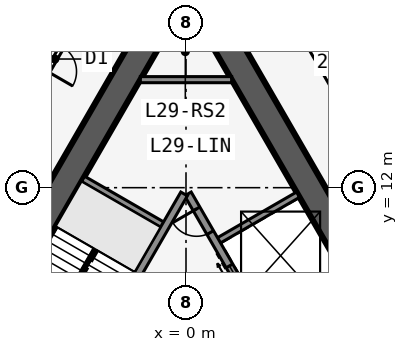
"""IFC4 building model, lengths in metres.
Left out: names, types, materials, properties, quantities, classifications, styles, units other than length and angle.
Written with IfcOpenShell. Run it as: python <this file> out.ifc"""

import sys

from ifc_helpers import new_model, si_unit, direction, frame, frame_2d, origin, place, context, subcontext, project, spatial, rectangle, extrude, element, fill, save


model = new_model("IFC4")
c1 = context("Model", 3, precision=1e-05, world=origin(), true_north=direction((0.0, 1.0)))
c2 = subcontext(c1, "Body", "Model", "MODEL_VIEW")
j1 = project(units=[si_unit("LENGTHUNIT", "METRE"), si_unit("PLANEANGLEUNIT", "RADIAN")], contexts=[c1])
p1 = place(None, origin())
s1 = spatial("IfcSite", under=j1, at=p1, CompositionType="ELEMENT")
p2 = place(p1, origin())
s2 = spatial("IfcBuilding", under=s1, at=p2, CompositionType="ELEMENT")
p3 = place(p2, frame((0.0, 0.0, 114.7)))
s3 = spatial("IfcBuildingStorey", under=s2, at=p3, CompositionType="ELEMENT", Elevation=114.7)
p4 = place(p3, frame((16.5, -9.526, 0.0), z_axis=(0.0, 0.0, 1.0), x_axis=(-0.499999749417, 0.866025548458, 0.0)))
e1 = element("IfcWall", 1, at=p4, inside=s3, PredefinedType="SHEAR", context=c2, shape_type="SweptSolid", body=[
    extrude(rectangle(XDim=33.0, YDim=0.9, at=frame_2d((16.5, 0.0))), origin(), (0.0, 0.0, 1.0), 3.4),
])
p5 = place(p4, frame((14.15, 0.0, 0.0)))
e2 = element("IfcOpeningElement", 2, at=p5, cuts=e1, PredefinedType="OPENING", context=c2, shape_type="SweptSolid", body=[
    extrude(rectangle(XDim=1.8, YDim=2.13, at=frame_2d((0.9, 1.065))), frame((0.0, 0.46, 0.0), z_axis=(0.0, -1.0, 0.0), x_axis=(1.0, 0.0, 0.0)), (0.0, 0.0, 1.0), 0.92),
])
p6 = place(p4, frame((12.6, 0.0, 0.0)))
e3 = element("IfcOpeningElement", 3, at=p6, cuts=e1, PredefinedType="OPENING", context=c2, shape_type="SweptSolid", body=[
    extrude(rectangle(XDim=1.0, YDim=2.13, at=frame_2d((0.5, 1.065))), frame((0.0, 0.46, 0.0), z_axis=(0.0, -1.0, 0.0), x_axis=(1.0, 0.0, 0.0)), (0.0, 0.0, 1.0), 0.92),
])
p7 = place(p3, frame((5.379, 2.586, 0.0), z_axis=(0.0, 0.0, 1.0), x_axis=(-0.500001375892, 0.866024609411, 0.0)))
e4 = element("IfcWall", 4, at=p7, inside=s3, PredefinedType="SOLIDWALL", context=c2, shape_type="SweptSolid", body=[
    extrude(rectangle(XDim=10.633, YDim=0.25, at=frame_2d((5.316, 0.0))), origin(), (0.0, 0.0, 1.0), 3.235),
])
p8 = place(p7, frame((9.164, 0.0, 0.0)))
e5 = element("IfcOpeningElement", 5, at=p8, cuts=e4, PredefinedType="OPENING", context=c2, shape_type="SweptSolid", body=[
    extrude(rectangle(XDim=0.9, YDim=2.13, at=frame_2d((0.45, 1.065))), frame((0.0, 0.135, 0.0), z_axis=(0.0, -1.0, 0.0), x_axis=(1.0, 0.0, 0.0)), (0.0, 0.0, 1.0), 0.27),
])
p9 = place(p7, frame((1.0, 0.0, 0.0)))
e6 = element("IfcOpeningElement", 6, at=p9, cuts=e4, PredefinedType="OPENING", context=c2, shape_type="SweptSolid", body=[
    extrude(rectangle(XDim=1.1, YDim=2.13, at=frame_2d((0.55, 1.065))), frame((0.0, 0.135, 0.0), z_axis=(0.0, -1.0, 0.0), x_axis=(1.0, 0.0, 0.0)), (0.0, 0.0, 1.0), 0.27),
])
p10 = place(p7, frame((3.9, 0.0, 0.0)))
e7 = element("IfcOpeningElement", 7, at=p10, cuts=e4, PredefinedType="OPENING", context=c2, shape_type="SweptSolid", body=[
    extrude(rectangle(XDim=1.1, YDim=2.13, at=frame_2d((0.55, 1.065))), frame((0.0, 0.135, 0.0), z_axis=(0.0, -1.0, 0.0), x_axis=(1.0, 0.0, 0.0)), (0.0, 0.0, 1.0), 0.27),
])
p11 = place(p7, frame((6.8, 0.0, 0.0)))
e8 = element("IfcOpeningElement", 8, at=p11, cuts=e4, PredefinedType="OPENING", context=c2, shape_type="SweptSolid", body=[
    extrude(rectangle(XDim=1.1, YDim=2.13, at=frame_2d((0.55, 1.065))), frame((0.0, 0.135, 0.0), z_axis=(0.0, -1.0, 0.0), x_axis=(1.0, 0.0, 0.0)), (0.0, 0.0, 1.0), 0.27),
])
for number, where, z_axis, x_axis in (
    (9, (2.429, 7.696, 0.0), (0.0, 0.0, 1.0), (0.866, 0.5, 0.0)),
    (10, (0.979, 10.207, 0.0), (0.0, 0.0, 1.0), (0.866, 0.5, 0.0)),
):
    element("IfcWall", number, at=place(p3, frame(where, z_axis=z_axis, x_axis=x_axis)), inside=s3, PredefinedType="SOLIDWALL", context=c2, shape_type="SweptSolid", body=[
        extrude(rectangle(XDim=3.125, YDim=0.2, at=frame_2d((1.562, 0.0))), origin(), (0.0, 0.0, 1.0), 3.235),
    ])
p12 = place(p3, frame((0.0, 19.052, 0.0), z_axis=(0.0, 0.0, 1.0), x_axis=(-0.499999749417, -0.866025548458, 0.0)))
e11 = element("IfcWall", 11, at=p12, inside=s3, PredefinedType="SHEAR", context=c2, shape_type="SweptSolid", body=[
    extrude(rectangle(XDim=33.0, YDim=0.9, at=frame_2d((16.5, 0.0))), origin(), (0.0, 0.0, 1.0), 3.4),
])
p13 = place(p12, frame((14.15, 0.0, 0.0)))
e12 = element("IfcOpeningElement", 12, at=p13, cuts=e11, PredefinedType="OPENING", context=c2, shape_type="SweptSolid", body=[
    extrude(rectangle(XDim=1.8, YDim=2.13, at=frame_2d((0.9, 1.065))), frame((0.0, 0.46, 0.0), z_axis=(0.0, -1.0, 0.0), x_axis=(1.0, 0.0, 0.0)), (0.0, 0.0, 1.0), 0.92),
])
p14 = place(p12, frame((12.6, 0.0, 0.0)))
e13 = element("IfcOpeningElement", 13, at=p14, cuts=e11, PredefinedType="OPENING", context=c2, shape_type="SweptSolid", body=[
    extrude(rectangle(XDim=1.0, YDim=2.13, at=frame_2d((0.5, 1.065))), frame((0.0, 0.46, 0.0), z_axis=(0.0, -1.0, 0.0), x_axis=(1.0, 0.0, 0.0)), (0.0, 0.0, 1.0), 0.92),
])
p15 = place(p3, frame((-0.062, 11.794, 0.0), z_axis=(0.0, 0.0, 1.0), x_axis=(-0.500006680225, -0.86602154692, 0.0)))
e14 = element("IfcWall", 14, at=p15, inside=s3, PredefinedType="SOLIDWALL", context=c2, shape_type="SweptSolid", body=[
    extrude(rectangle(XDim=7.733, YDim=0.25, at=frame_2d((3.866, 0.0))), origin(), (0.0, 0.0, 1.0), 3.235),
])
p16 = place(p3, frame((-0.679, 10.727, 0.0), z_axis=(0.0, 0.0, 1.0), x_axis=(-0.866022959057, 0.500004234368, 0.0)))
e15 = element("IfcWall", 15, at=p16, inside=s3, PredefinedType="SOLIDWALL", context=c2, shape_type="SweptSolid", body=[
    extrude(rectangle(XDim=3.125, YDim=0.2, at=frame_2d((1.562, 0.0))), origin(), (0.0, 0.0, 1.0), 3.235),
])
p17 = place(p3, frame((20.027, -10.985, 0.0), z_axis=(0.0, 0.0, 1.0), x_axis=(-0.500001677587, 0.866024435227, 0.0)))
e16 = element("IfcWall", 16, at=p17, inside=s3, PredefinedType="PARTITIONING", context=c2, shape_type="SweptSolid", body=[
    extrude(rectangle(XDim=39.054, YDim=0.15, at=frame_2d((19.527, 0.0))), origin(), (0.0, 0.0, 1.0), 3.235),
])
p18 = place(p17, frame((0.352, 0.0, 0.0)))
e17 = element("IfcOpeningElement", 17, at=p18, cuts=e16, PredefinedType="OPENING", context=c2, shape_type="SweptSolid", body=[
    extrude(rectangle(XDim=0.95, YDim=2.13, at=frame_2d((0.475, 1.065))), frame((0.0, 0.085, 0.0), z_axis=(0.0, -1.0, 0.0), x_axis=(1.0, 0.0, 0.0)), (0.0, 0.0, 1.0), 0.17),
])
p19 = place(p17, frame((7.752, 0.0, 0.0)))
e18 = element("IfcOpeningElement", 18, at=p19, cuts=e16, PredefinedType="OPENING", context=c2, shape_type="SweptSolid", body=[
    extrude(rectangle(XDim=0.95, YDim=2.13, at=frame_2d((0.475, 1.065))), frame((0.0, 0.085, 0.0), z_axis=(0.0, -1.0, 0.0), x_axis=(1.0, 0.0, 0.0)), (0.0, 0.0, 1.0), 0.17),
])
p20 = place(p17, frame((17.752, 0.0, 0.0)))
e19 = element("IfcOpeningElement", 19, at=p20, cuts=e16, PredefinedType="OPENING", context=c2, shape_type="SweptSolid", body=[
    extrude(rectangle(XDim=0.95, YDim=2.13, at=frame_2d((0.475, 1.065))), frame((0.0, 0.085, 0.0), z_axis=(0.0, -1.0, 0.0), x_axis=(1.0, 0.0, 0.0)), (0.0, 0.0, 1.0), 0.17),
])
p21 = place(p17, frame((22.152, 0.0, 0.0)))
e20 = element("IfcOpeningElement", 20, at=p21, cuts=e16, PredefinedType="OPENING", context=c2, shape_type="SweptSolid", body=[
    extrude(rectangle(XDim=0.95, YDim=2.13, at=frame_2d((0.475, 1.065))), frame((0.0, 0.085, 0.0), z_axis=(0.0, -1.0, 0.0), x_axis=(1.0, 0.0, 0.0)), (0.0, 0.0, 1.0), 0.17),
])
p22 = place(p17, frame((27.152, 0.0, 0.0)))
e21 = element("IfcOpeningElement", 21, at=p22, cuts=e16, PredefinedType="OPENING", context=c2, shape_type="SweptSolid", body=[
    extrude(rectangle(XDim=0.95, YDim=2.13, at=frame_2d((0.475, 1.065))), frame((0.0, 0.085, 0.0), z_axis=(0.0, -1.0, 0.0), x_axis=(1.0, 0.0, 0.0)), (0.0, 0.0, 1.0), 0.17),
])
p23 = place(p17, frame((36.546, 0.0, 0.0)))
e22 = element("IfcOpeningElement", 22, at=p23, cuts=e16, PredefinedType="OPENING", context=c2, shape_type="SweptSolid", body=[
    extrude(rectangle(XDim=0.95, YDim=2.13, at=frame_2d((0.475, 1.065))), frame((0.0, 0.085, 0.0), z_axis=(0.0, -1.0, 0.0), x_axis=(1.0, 0.0, 0.0)), (0.0, 0.0, 1.0), 0.17),
])
p24 = place(p3, frame((-0.5, 22.836, 0.0), z_axis=(0.0, 0.0, 1.0), x_axis=(-0.500001677587, -0.866024435227, 0.0)))
e23 = element("IfcWall", 23, at=p24, inside=s3, PredefinedType="PARTITIONING", context=c2, shape_type="SweptSolid", body=[
    extrude(rectangle(XDim=39.054, YDim=0.15, at=frame_2d((19.527, 0.0))), origin(), (0.0, 0.0, 1.0), 3.235),
])
p25 = place(p24, frame((0.352, 0.0, 0.0)))
e24 = element("IfcOpeningElement", 24, at=p25, cuts=e23, PredefinedType="OPENING", context=c2, shape_type="SweptSolid", body=[
    extrude(rectangle(XDim=0.95, YDim=2.13, at=frame_2d((0.475, 1.065))), frame((0.0, 0.085, 0.0), z_axis=(0.0, -1.0, 0.0), x_axis=(1.0, 0.0, 0.0)), (0.0, 0.0, 1.0), 0.17),
])
p26 = place(p24, frame((7.152, 0.0, 0.0)))
e25 = element("IfcOpeningElement", 25, at=p26, cuts=e23, PredefinedType="OPENING", context=c2, shape_type="SweptSolid", body=[
    extrude(rectangle(XDim=0.95, YDim=2.13, at=frame_2d((0.475, 1.065))), frame((0.0, 0.085, 0.0), z_axis=(0.0, -1.0, 0.0), x_axis=(1.0, 0.0, 0.0)), (0.0, 0.0, 1.0), 0.17),
])
p27 = place(p24, frame((12.152, 0.0, 0.0)))
e26 = element("IfcOpeningElement", 26, at=p27, cuts=e23, PredefinedType="OPENING", context=c2, shape_type="SweptSolid", body=[
    extrude(rectangle(XDim=0.95, YDim=2.13, at=frame_2d((0.475, 1.065))), frame((0.0, 0.085, 0.0), z_axis=(0.0, -1.0, 0.0), x_axis=(1.0, 0.0, 0.0)), (0.0, 0.0, 1.0), 0.17),
])
p28 = place(p24, frame((17.152, 0.0, 0.0)))
e27 = element("IfcOpeningElement", 27, at=p28, cuts=e23, PredefinedType="OPENING", context=c2, shape_type="SweptSolid", body=[
    extrude(rectangle(XDim=0.95, YDim=2.13, at=frame_2d((0.475, 1.065))), frame((0.0, 0.085, 0.0), z_axis=(0.0, -1.0, 0.0), x_axis=(1.0, 0.0, 0.0)), (0.0, 0.0, 1.0), 0.17),
])
p29 = place(p24, frame((22.752, 0.0, 0.0)))
e28 = element("IfcOpeningElement", 28, at=p29, cuts=e23, PredefinedType="OPENING", context=c2, shape_type="SweptSolid", body=[
    extrude(rectangle(XDim=0.95, YDim=2.13, at=frame_2d((0.475, 1.065))), frame((0.0, 0.085, 0.0), z_axis=(0.0, -1.0, 0.0), x_axis=(1.0, 0.0, 0.0)), (0.0, 0.0, 1.0), 0.17),
])
p30 = place(p24, frame((32.152, 0.0, 0.0)))
e29 = element("IfcOpeningElement", 29, at=p30, cuts=e23, PredefinedType="OPENING", context=c2, shape_type="SweptSolid", body=[
    extrude(rectangle(XDim=0.95, YDim=2.13, at=frame_2d((0.475, 1.065))), frame((0.0, 0.085, 0.0), z_axis=(0.0, -1.0, 0.0), x_axis=(1.0, 0.0, 0.0)), (0.0, 0.0, 1.0), 0.17),
])
p31 = place(p24, frame((37.752, 0.0, 0.0)))
e30 = element("IfcOpeningElement", 30, at=p31, cuts=e23, PredefinedType="OPENING", context=c2, shape_type="SweptSolid", body=[
    extrude(rectangle(XDim=0.95, YDim=2.13, at=frame_2d((0.475, 1.065))), frame((0.0, 0.085, 0.0), z_axis=(0.0, -1.0, 0.0), x_axis=(1.0, 0.0, 0.0)), (0.0, 0.0, 1.0), 0.17),
])
p32 = place(p3, frame((-1.501, 15.552, 0.0), z_axis=(0.0, 0.0, 1.0), x_axis=(1.0, 0.0, 0.0)))
e31 = element("IfcWall", 31, at=p32, inside=s3, PredefinedType="SOLIDWALL", context=c2, shape_type="SweptSolid", body=[
    extrude(rectangle(XDim=3.002, YDim=0.2, at=frame_2d((1.501, 0.0))), origin(), (0.0, 0.0, 1.0), 3.235),
])
p33 = place(p3, frame((-2.988, 9.978, 0.0), z_axis=(0.0, 0.0, 1.0), x_axis=(-0.499992232847, -0.866029888106, 0.0)))
e32 = element("IfcWall", 32, at=p33, inside=s3, PredefinedType="SOLIDWALL", context=c2, shape_type="SweptSolid", body=[
    extrude(rectangle(XDim=2.794, YDim=0.1, at=frame_2d((1.397, 0.0))), origin(), (0.0, 0.0, 1.0), 3.4),
])
p34 = place(p26, origin())
e33 = element("IfcDoor", 33, at=p34, inside=s3, OperationType="SINGLE_SWING_RIGHT", PredefinedType="DOOR", context=c2, shape_type="SweptSolid", body=[
    extrude(rectangle(XDim=0.95, YDim=2.13, at=frame_2d((0.475, 1.065))), frame((0.0, 0.025, 0.0), z_axis=(0.0, -1.0, 0.0), x_axis=(1.0, 0.0, 0.0)), (0.0, 0.0, 1.0), 0.05),
])
fill(e25, e33)
p35 = place(p8, origin())
e34 = element("IfcDoor", 34, at=p35, inside=s3, OperationType="SINGLE_SWING_RIGHT", PredefinedType="DOOR", context=c2, shape_type="SweptSolid", body=[
    extrude(rectangle(XDim=0.9, YDim=2.13, at=frame_2d((0.45, 1.065))), frame((0.0, 0.025, 0.0), z_axis=(0.0, -1.0, 0.0), x_axis=(1.0, 0.0, 0.0)), (0.0, 0.0, 1.0), 0.05),
])
fill(e5, e34)
p36 = place(p11, origin())
e35 = element("IfcDoor", 35, at=p36, inside=s3, OperationType="DOUBLE_DOOR_SLIDING", PredefinedType="USERDEFINED", context=c2, shape_type="SweptSolid", body=[
    extrude(rectangle(XDim=1.1, YDim=2.13, at=frame_2d((0.55, 1.065))), frame((0.0, 0.025, 0.0), z_axis=(0.0, -1.0, 0.0), x_axis=(1.0, 0.0, 0.0)), (0.0, 0.0, 1.0), 0.05),
])
fill(e8, e35)
save(model, sys.argv[1])
